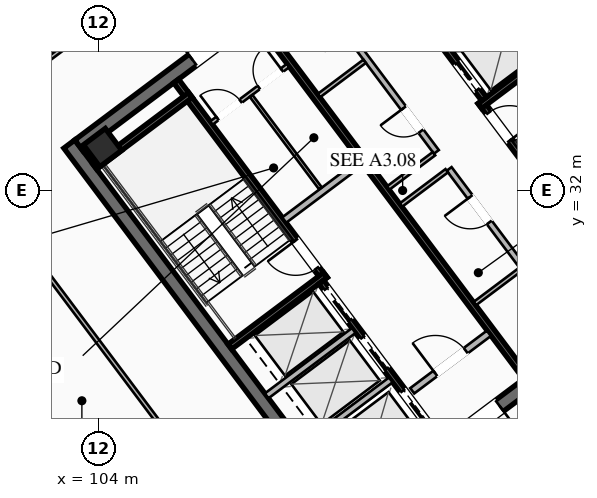
"""IFC4 building model, lengths in metres.
Left out: names, types, materials, properties, quantities, classifications, styles, units other than length and angle.
Written with IfcOpenShell. Run it as: python <this file> out.ifc"""

import sys

from ifc_helpers import new_model, si_unit, direction, frame, frame_2d, origin, origin_2d, place, context, subcontext, project, spatial, rectangle, hollow_rectangle, extrude, element, fill, save


model = new_model("IFC4")
c1 = context("Model", 3, precision=1e-05, world=origin(), true_north=direction((0.0, 1.0)))
c2 = subcontext(c1, "Body", "Model", "MODEL_VIEW")
j1 = project(units=[si_unit("LENGTHUNIT", "METRE"), si_unit("PLANEANGLEUNIT", "RADIAN")], contexts=[c1])
p1 = place(None, origin())
s1 = spatial("IfcSite", under=j1, at=p1, CompositionType="ELEMENT")
p2 = place(p1, origin())
s2 = spatial("IfcBuilding", under=s1, at=p2, CompositionType="ELEMENT")
p3 = place(p2, frame((0.0, 0.0, 239.7)))
s3 = spatial("IfcBuildingStorey", under=s2, at=p3, CompositionType="ELEMENT", Elevation=239.7)
for number, where, z_axis, x_axis in (
    (1, (112.396, 21.047, 0.0), (0.0, 0.0, 1.0), (-0.6, 0.8, 0.0)),
    (2, (115.604, 42.953, 0.0), (0.0, 0.0, 1.0), (0.6, -0.8, 0.0)),
):
    element("IfcWall", number, at=place(p3, frame(where, z_axis=z_axis, x_axis=x_axis)), inside=s3, PredefinedType="SHEAR", context=c2, shape_type="SweptSolid", body=[
        extrude(rectangle(XDim=15.6, YDim=0.45, at=frame_2d((7.8, 0.0))), origin(), (0.0, 0.0, 1.0), 3.55),
    ])
p4 = place(p3, frame((124.649, 30.518, 0.0), z_axis=(0.0, 0.0, 1.0), x_axis=(-0.8, -0.6, 0.0)))
e3 = element("IfcWall", 3, at=p4, inside=s3, PredefinedType="SHEAR", context=c2, shape_type="SweptSolid", body=[
    extrude(rectangle(XDim=15.26, YDim=0.45, at=frame_2d((7.63, 0.0))), origin(), (0.0, 0.0, 1.0), 3.55),
])
p5 = place(p4, frame((9.33, 0.0, 0.0)))
e4 = element("IfcOpeningElement", 4, at=p5, cuts=e3, PredefinedType="OPENING", context=c2, shape_type="SweptSolid", body=[
    extrude(rectangle(XDim=1.25, YDim=2.25, at=frame_2d((0.625, 1.125))), frame((0.0, 0.235, 0.0), z_axis=(0.0, -1.0, 0.0), x_axis=(1.0, 0.0, 0.0)), (0.0, 0.0, 1.0), 0.47),
])
p6 = place(p4, frame((4.28, 0.0, 0.0)))
e5 = element("IfcOpeningElement", 5, at=p6, cuts=e3, PredefinedType="OPENING", context=c2, shape_type="SweptSolid", body=[
    extrude(rectangle(XDim=1.25, YDim=2.25, at=frame_2d((0.625, 1.125))), frame((0.0, 0.235, 0.0), z_axis=(0.0, -1.0, 0.0), x_axis=(1.0, 0.0, 0.0)), (0.0, 0.0, 1.0), 0.47),
])
p7 = place(p3, frame((103.351, 33.482, 0.0), z_axis=(0.0, 0.0, 1.0), x_axis=(0.8, 0.6, 0.0)))
e6 = element("IfcWall", 6, at=p7, inside=s3, PredefinedType="SHEAR", context=c2, shape_type="SweptSolid", body=[
    extrude(rectangle(XDim=15.26, YDim=0.45, at=frame_2d((7.63, 0.0))), origin(), (0.0, 0.0, 1.0), 3.55),
])
p8 = place(p7, frame((4.68, 0.0, 0.0)))
e7 = element("IfcOpeningElement", 7, at=p8, cuts=e6, PredefinedType="OPENING", context=c2, shape_type="SweptSolid", body=[
    extrude(rectangle(XDim=1.25, YDim=2.25, at=frame_2d((0.625, 1.125))), frame((0.0, 0.235, 0.0), z_axis=(0.0, -1.0, 0.0), x_axis=(1.0, 0.0, 0.0)), (0.0, 0.0, 1.0), 0.47),
])
p9 = place(p7, frame((9.73, 0.0, 0.0)))
e8 = element("IfcOpeningElement", 8, at=p9, cuts=e6, PredefinedType="OPENING", context=c2, shape_type="SweptSolid", body=[
    extrude(rectangle(XDim=1.25, YDim=2.25, at=frame_2d((0.625, 1.125))), frame((0.0, 0.235, 0.0), z_axis=(0.0, -1.0, 0.0), x_axis=(1.0, 0.0, 0.0)), (0.0, 0.0, 1.0), 0.47),
])
p10 = place(p3, frame((104.13, 33.41, 0.0), z_axis=(0.0, 0.0, 1.0), x_axis=(0.799999996291, 0.600000004945, 0.0)))
e9 = element("IfcColumn", 9, at=p10, inside=s3, PredefinedType="COLUMN", context=c2, shape_type="SweptSolid", body=[
    extrude(hollow_rectangle(XDim=0.9, YDim=0.9, WallThickness=0.04, at=origin_2d()), origin(), (0.0, 0.0, 1.0), 3.37),
])
p11 = place(p3, frame((111.44, 29.08, 0.0), z_axis=(0.0, 0.0, 1.0), x_axis=(-0.59999041401, 0.800007189403, 0.0)))
e10 = element("IfcWall", 10, at=p11, inside=s3, PredefinedType="SHEAR", context=c2, shape_type="SweptSolid", body=[
    extrude(rectangle(XDim=8.15, YDim=0.2, at=frame_2d((4.075, 0.0))), origin(), (0.0, 0.0, 1.0), 3.37),
])
p12 = place(p11, frame((0.45, 0.0, 0.0)))
e11 = element("IfcOpeningElement", 11, at=p12, cuts=e10, PredefinedType="OPENING", context=c2, shape_type="SweptSolid", body=[
    extrude(rectangle(XDim=1.15, YDim=2.2, at=frame_2d((0.575, 1.1))), frame((0.0, 0.11, 0.0), z_axis=(0.0, -1.0, 0.0), x_axis=(1.0, 0.0, 0.0)), (0.0, 0.0, 1.0), 0.22),
])
for number, where, z_axis, x_axis in (
    (12, (108.316, 26.862, 0.0), (0.0, 0.0, 1.0), (0.8, 0.6, 0.0)),
    (13, (103.876, 32.782, 0.0), (0.0, 0.0, 1.0), (0.8, 0.6, 0.0)),
):
    element("IfcWall", number, at=place(p3, frame(where, z_axis=z_axis, x_axis=x_axis)), inside=s3, PredefinedType="SHEAR", context=c2, shape_type="SweptSolid", body=[
        extrude(rectangle(XDim=3.93, YDim=0.2, at=frame_2d((1.965, 0.0))), origin(), (0.0, 0.0, 1.0), 3.37),
    ])
p13 = place(p3, frame((116.56, 34.92, 0.0), z_axis=(0.0, 0.0, 1.0), x_axis=(0.59999041401, -0.800007189403, 0.0)))
e14 = element("IfcWall", 14, at=p13, inside=s3, PredefinedType="SHEAR", context=c2, shape_type="SweptSolid", body=[
    extrude(rectangle(XDim=8.15, YDim=0.2, at=frame_2d((4.075, 0.0))), origin(), (0.0, 0.0, 1.0), 3.37),
])
p14 = place(p13, frame((0.45, 0.0, 0.0)))
e15 = element("IfcOpeningElement", 15, at=p14, cuts=e14, PredefinedType="OPENING", context=c2, shape_type="SweptSolid", body=[
    extrude(rectangle(XDim=1.15, YDim=2.2, at=frame_2d((0.575, 1.1))), frame((0.0, 0.11, 0.0), z_axis=(0.0, -1.0, 0.0), x_axis=(1.0, 0.0, 0.0)), (0.0, 0.0, 1.0), 0.22),
])
p15 = place(p3, frame((116.54, 34.78, 0.0), z_axis=(0.0, 0.0, 1.0), x_axis=(0.800014909178, 0.599980120581, 0.0)))
e16 = element("IfcWall", 16, at=p15, inside=s3, PredefinedType="SHEAR", context=c2, shape_type="SweptSolid", body=[
    extrude(rectangle(XDim=3.93, YDim=0.2, at=frame_2d((1.965, 0.0))), origin(), (0.0, 0.0, 1.0), 3.37),
])
p16 = place(p3, frame((118.058, 25.856, 0.0), z_axis=(0.0, 0.0, 1.0), x_axis=(-0.600002657301, 0.799998007018, 0.0)))
e17 = element("IfcWall", 17, at=p16, inside=s3, PredefinedType="SHEAR", context=c2, shape_type="SweptSolid", body=[
    extrude(rectangle(XDim=14.7, YDim=0.2, at=frame_2d((7.35, 0.0))), origin(), (0.0, 0.0, 1.0), 3.37),
])
p17 = place(p3, frame((110.104, 31.028, 0.0), z_axis=(0.0, 0.0, 1.0), x_axis=(0.800018601094, 0.59997519774, 0.0)))
e18 = element("IfcWall", 18, at=p17, inside=s3, PredefinedType="SOLIDWALL", context=c2, shape_type="SweptSolid", body=[
    extrude(rectangle(XDim=3.15, YDim=0.22, at=frame_2d((1.575, 0.0))), origin(), (0.0, 0.0, 1.0), 2.723),
])
p18 = place(p3, frame((114.316, 25.412, 0.0), z_axis=(0.0, 0.0, 1.0), x_axis=(0.800018601094, 0.59997519774, 0.0)))
e19 = element("IfcWall", 19, at=p18, inside=s3, PredefinedType="SOLIDWALL", context=c2, shape_type="SweptSolid", body=[
    extrude(rectangle(XDim=3.15, YDim=0.22, at=frame_2d((1.575, 0.0))), origin(), (0.0, 0.0, 1.0), 2.723),
])
p19 = place(p18, frame((0.95, 0.0, 0.0)))
e20 = element("IfcOpeningElement", 20, at=p19, cuts=e19, PredefinedType="OPENING", context=c2, shape_type="SweptSolid", body=[
    extrude(rectangle(XDim=1.25, YDim=2.25, at=frame_2d((0.625, 1.125))), frame((0.0, 0.12, 0.0), z_axis=(0.0, -1.0, 0.0), x_axis=(1.0, 0.0, 0.0)), (0.0, 0.0, 1.0), 0.24),
])
p20 = place(p3, frame((115.25, 23.75, 0.0), z_axis=(0.0, 0.0, 1.0), x_axis=(-0.599994036198, 0.800004472816, 0.0)))
e21 = element("IfcWall", 21, at=p20, inside=s3, PredefinedType="SHEAR", context=c2, shape_type="SweptSolid", body=[
    extrude(rectangle(XDim=6.55, YDim=0.2, at=frame_2d((3.275, 0.0))), origin(), (0.0, 0.0, 1.0), 3.37),
])
p21 = place(p20, frame((4.975, 0.0, 0.0)))
e22 = element("IfcOpeningElement", 22, at=p21, cuts=e21, PredefinedType="OPENING", context=c2, shape_type="SweptSolid", body=[
    extrude(rectangle(XDim=1.3, YDim=2.25, at=frame_2d((0.65, 1.125))), frame((0.0, 0.11, 0.0), z_axis=(0.0, -1.0, 0.0), x_axis=(1.0, 0.0, 0.0)), (0.0, 0.0, 1.0), 0.22),
])
p22 = place(p20, frame((2.975, 0.0, 0.0)))
e23 = element("IfcOpeningElement", 23, at=p22, cuts=e21, PredefinedType="OPENING", context=c2, shape_type="SweptSolid", body=[
    extrude(rectangle(XDim=1.3, YDim=2.25, at=frame_2d((0.65, 1.125))), frame((0.0, 0.11, 0.0), z_axis=(0.0, -1.0, 0.0), x_axis=(1.0, 0.0, 0.0)), (0.0, 0.0, 1.0), 0.22),
])
p23 = place(p20, frame((0.775, 0.0, 0.0)))
e24 = element("IfcOpeningElement", 24, at=p23, cuts=e21, PredefinedType="OPENING", context=c2, shape_type="SweptSolid", body=[
    extrude(rectangle(XDim=1.3, YDim=2.25, at=frame_2d((0.65, 1.125))), frame((0.0, 0.11, 0.0), z_axis=(0.0, -1.0, 0.0), x_axis=(1.0, 0.0, 0.0)), (0.0, 0.0, 1.0), 0.22),
])
for number, where, z_axis, x_axis in (
    (25, (110.746, 23.622, 0.0), (0.0, 0.0, 1.0), (0.8, 0.6, 0.0)),
    (26, (109.528, 25.246, 0.0), (0.0, 0.0, 1.0), (0.8, 0.6, 0.0)),
):
    element("IfcWall", number, at=place(p3, frame(where, z_axis=z_axis, x_axis=x_axis)), inside=s3, PredefinedType="SOLIDWALL", context=c2, shape_type="SweptSolid", body=[
        extrude(rectangle(XDim=3.58, YDim=0.2, at=frame_2d((1.79, 0.0))), origin(), (0.0, 0.0, 1.0), 3.37),
    ])
p24 = place(p3, frame((112.75, 40.25, 0.0), z_axis=(0.0, 0.0, 1.0), x_axis=(0.599994036198, -0.800004472816, 0.0)))
e27 = element("IfcWall", 27, at=p24, inside=s3, PredefinedType="SHEAR", context=c2, shape_type="SweptSolid", body=[
    extrude(rectangle(XDim=6.55, YDim=0.2, at=frame_2d((3.275, 0.0))), origin(), (0.0, 0.0, 1.0), 3.37),
])
p25 = place(p24, frame((5.075, 0.0, 0.0)))
e28 = element("IfcOpeningElement", 28, at=p25, cuts=e27, PredefinedType="OPENING", context=c2, shape_type="SweptSolid", body=[
    extrude(rectangle(XDim=1.1, YDim=2.2, at=frame_2d((0.55, 1.1))), frame((0.0, 0.11, 0.0), z_axis=(0.0, -1.0, 0.0), x_axis=(1.0, 0.0, 0.0)), (0.0, 0.0, 1.0), 0.22),
])
p26 = place(p24, frame((3.025, 0.0, 0.0)))
e29 = element("IfcOpeningElement", 29, at=p26, cuts=e27, PredefinedType="OPENING", context=c2, shape_type="SweptSolid", body=[
    extrude(rectangle(XDim=1.1, YDim=2.2, at=frame_2d((0.55, 1.1))), frame((0.0, 0.11, 0.0), z_axis=(0.0, -1.0, 0.0), x_axis=(1.0, 0.0, 0.0)), (0.0, 0.0, 1.0), 0.22),
])
p27 = place(p24, frame((1.025, 0.0, 0.0)))
e30 = element("IfcOpeningElement", 30, at=p27, cuts=e27, PredefinedType="OPENING", context=c2, shape_type="SweptSolid", body=[
    extrude(rectangle(XDim=1.1, YDim=2.2, at=frame_2d((0.55, 1.1))), frame((0.0, 0.11, 0.0), z_axis=(0.0, -1.0, 0.0), x_axis=(1.0, 0.0, 0.0)), (0.0, 0.0, 1.0), 0.22),
])
p28 = place(p3, frame((107.71, 34.22, 0.0), z_axis=(0.0, 0.0, 1.0), x_axis=(0.799981399002, 0.60002480053, 0.0)))
e31 = element("IfcWall", 31, at=p28, inside=s3, PredefinedType="PARTITIONING", context=c2, shape_type="SweptSolid", body=[
    extrude(rectangle(XDim=3.15, YDim=0.135, at=frame_2d((1.575, 0.0))), origin(), (0.0, 0.0, 1.0), 2.723),
])
p29 = place(p28, frame((0.25, 0.0, 0.0)))
e32 = element("IfcOpeningElement", 32, at=p29, cuts=e31, PredefinedType="OPENING", context=c2, shape_type="SweptSolid", body=[
    extrude(rectangle(XDim=0.95, YDim=2.05, at=frame_2d((0.475, 1.025))), frame((0.0, 0.077, 0.0), z_axis=(0.0, -1.0, 0.0), x_axis=(1.0, 0.0, 0.0)), (0.0, 0.0, 1.0), 0.155),
])
p30 = place(p28, frame((1.95, 0.0, 0.0)))
e33 = element("IfcOpeningElement", 33, at=p30, cuts=e31, PredefinedType="OPENING", context=c2, shape_type="SweptSolid", body=[
    extrude(rectangle(XDim=0.95, YDim=2.05, at=frame_2d((0.475, 1.025))), frame((0.0, 0.077, 0.0), z_axis=(0.0, -1.0, 0.0), x_axis=(1.0, 0.0, 0.0)), (0.0, 0.0, 1.0), 0.155),
])
p31 = place(p3, frame((111.296, 32.072, 0.0), z_axis=(0.0, 0.0, 1.0), x_axis=(-0.59995887973, 0.800030838552, 0.0)))
e34 = element("IfcWall", 34, at=p31, inside=s3, PredefinedType="PARTITIONING", context=c2, shape_type="SweptSolid", body=[
    extrude(rectangle(XDim=3.8, YDim=0.11, at=frame_2d((1.9, 0.0))), origin(), (0.0, 0.0, 1.0), 2.723),
])
p32 = place(p3, frame((119.73, 27.11, 0.0), z_axis=(0.0, 0.0, 1.0), x_axis=(-0.600005580459, 0.799995814625, 0.0)))
e35 = element("IfcWall", 35, at=p32, inside=s3, PredefinedType="SOLIDWALL", context=c2, shape_type="SweptSolid", body=[
    extrude(rectangle(XDim=7.0, YDim=0.2, at=frame_2d((3.5, 0.0))), origin(), (0.0, 0.0, 1.0), 2.723),
])
p33 = place(p32, frame((0.85, 0.0, 0.0)))
e36 = element("IfcOpeningElement", 36, at=p33, cuts=e35, PredefinedType="OPENING", context=c2, shape_type="SweptSolid", body=[
    extrude(rectangle(XDim=0.95, YDim=2.05, at=frame_2d((0.475, 1.025))), frame((0.0, 0.11, 0.0), z_axis=(0.0, -1.0, 0.0), x_axis=(1.0, 0.0, 0.0)), (0.0, 0.0, 1.0), 0.22),
])
p34 = place(p32, frame((4.8, 0.0, 0.0)))
e37 = element("IfcOpeningElement", 37, at=p34, cuts=e35, PredefinedType="OPENING", context=c2, shape_type="SweptSolid", body=[
    extrude(rectangle(XDim=1.05, YDim=2.2, at=frame_2d((0.525, 1.1))), frame((0.0, 0.11, 0.0), z_axis=(0.0, -1.0, 0.0), x_axis=(1.0, 0.0, 0.0)), (0.0, 0.0, 1.0), 0.22),
])
for number, where, z_axis, x_axis in (
    (38, (113.946, 31.522, 0.0), (0.0, 0.0, 1.0), (0.8, 0.6, 0.0)),
    (39, (116.376, 28.282, 0.0), (0.0, 0.0, 1.0), (0.8, 0.6, 0.0)),
):
    element("IfcWall", number, at=place(p3, frame(where, z_axis=z_axis, x_axis=x_axis)), inside=s3, PredefinedType="PARTITIONING", context=c2, shape_type="SweptSolid", body=[
        extrude(rectangle(XDim=1.88, YDim=0.135, at=frame_2d((0.94, 0.0))), origin(), (0.0, 0.0, 1.0), 2.723),
    ])
p35 = place(p3, frame((115.11, 33.27, 0.0), z_axis=(0.0, 0.0, 1.0), x_axis=(-0.600011160345, 0.79999162962, 0.0)))
e40 = element("IfcWall", 40, at=p35, inside=s3, PredefinedType="SOLIDWALL", context=c2, shape_type="SweptSolid", body=[
    extrude(rectangle(XDim=7.0, YDim=0.2, at=frame_2d((3.5, 0.0))), origin(), (0.0, 0.0, 1.0), 2.723),
])
p36 = place(p35, frame((0.85, 0.0, 0.0)))
e41 = element("IfcOpeningElement", 41, at=p36, cuts=e40, PredefinedType="OPENING", context=c2, shape_type="SweptSolid", body=[
    extrude(rectangle(XDim=0.95, YDim=2.05, at=frame_2d((0.475, 1.025))), frame((0.0, 0.11, 0.0), z_axis=(0.0, -1.0, 0.0), x_axis=(1.0, 0.0, 0.0)), (0.0, 0.0, 1.0), 0.22),
])
p37 = place(p35, frame((4.85, 0.0, 0.0)))
e42 = element("IfcOpeningElement", 42, at=p37, cuts=e40, PredefinedType="OPENING", context=c2, shape_type="SweptSolid", body=[
    extrude(rectangle(XDim=0.95, YDim=2.05, at=frame_2d((0.475, 1.025))), frame((0.0, 0.11, 0.0), z_axis=(0.0, -1.0, 0.0), x_axis=(1.0, 0.0, 0.0)), (0.0, 0.0, 1.0), 0.22),
])
p38 = place(p3, frame((113.526, 32.082, 0.0), z_axis=(0.0, 0.0, 1.0), x_axis=(0.800046745961, 0.599937666993, 0.0)))
e43 = element("IfcWall", 43, at=p38, inside=s3, PredefinedType="PARTITIONING", context=c2, shape_type="SweptSolid", body=[
    extrude(rectangle(XDim=1.88, YDim=0.135, at=frame_2d((0.94, 0.0))), origin(), (0.0, 0.0, 1.0), 2.723),
])
p39 = place(p3, frame((111.246, 35.122, 0.0), z_axis=(0.0, 0.0, 1.0), x_axis=(0.8, 0.6, 0.0)))
e44 = element("IfcWall", 44, at=p39, inside=s3, PredefinedType="PARTITIONING", context=c2, shape_type="SweptSolid", body=[
    extrude(rectangle(XDim=1.88, YDim=0.135, at=frame_2d((0.94, 0.0))), origin(), (0.0, 0.0, 1.0), 2.723),
])
p40 = place(p3, frame((98.93, 33.76, 0.0), z_axis=(0.0, 0.0, 1.0), x_axis=(0.8, 0.6, 0.0)))
e45 = element("IfcWall", 45, at=p40, inside=s3, PredefinedType="PARTITIONING", context=c2, shape_type="SweptSolid", body=[
    extrude(rectangle(XDim=23.85, YDim=0.135, at=frame_2d((11.925, 0.0))), origin(), (0.0, 0.0, 1.0), 2.723),
])
p41 = place(p40, frame((0.3, 0.0, 0.0)))
e46 = element("IfcOpeningElement", 46, at=p41, cuts=e45, PredefinedType="OPENING", context=c2, shape_type="SweptSolid", body=[
    extrude(rectangle(XDim=0.95, YDim=2.05, at=frame_2d((0.475, 1.025))), frame((0.0, 0.077, 0.0), z_axis=(0.0, -1.0, 0.0), x_axis=(1.0, 0.0, 0.0)), (0.0, 0.0, 1.0), 0.155),
])
p42 = place(p40, frame((10.779, 0.0, 0.0)))
e47 = element("IfcOpeningElement", 47, at=p42, cuts=e45, PredefinedType="OPENING", context=c2, shape_type="SweptSolid", body=[
    extrude(rectangle(XDim=0.95, YDim=2.05, at=frame_2d((0.475, 1.025))), frame((0.0, 0.077, 0.0), z_axis=(0.0, -1.0, 0.0), x_axis=(1.0, 0.0, 0.0)), (0.0, 0.0, 1.0), 0.155),
])
p43 = place(p40, frame((14.585, 0.0, 0.0)))
e48 = element("IfcOpeningElement", 48, at=p43, cuts=e45, PredefinedType="OPENING", context=c2, shape_type="SweptSolid", body=[
    extrude(rectangle(XDim=0.95, YDim=2.05, at=frame_2d((0.475, 1.025))), frame((0.0, 0.077, 0.0), z_axis=(0.0, -1.0, 0.0), x_axis=(1.0, 0.0, 0.0)), (0.0, 0.0, 1.0), 0.155),
])
p44 = place(p40, frame((22.6, 0.0, 0.0)))
e49 = element("IfcOpeningElement", 49, at=p44, cuts=e45, PredefinedType="OPENING", context=c2, shape_type="SweptSolid", body=[
    extrude(rectangle(XDim=0.95, YDim=2.05, at=frame_2d((0.475, 1.025))), frame((0.0, 0.077, 0.0), z_axis=(0.0, -1.0, 0.0), x_axis=(1.0, 0.0, 0.0)), (0.0, 0.0, 1.0), 0.155),
])
p45 = place(p3, frame((124.12, 25.84, 0.0), z_axis=(0.0, 0.0, 1.0), x_axis=(-0.800001902384, -0.599997463479, 0.0)))
e50 = element("IfcWall", 50, at=p45, inside=s3, PredefinedType="PARTITIONING", context=c2, shape_type="SweptSolid", body=[
    extrude(rectangle(XDim=15.4, YDim=0.135, at=frame_2d((7.7, 0.0))), origin(), (0.0, 0.0, 1.0), 2.723),
])
p46 = place(p45, frame((14.07, 0.0, 0.0)))
e51 = element("IfcOpeningElement", 51, at=p46, cuts=e50, PredefinedType="OPENING", context=c2, shape_type="SweptSolid", body=[
    extrude(rectangle(XDim=0.95, YDim=2.05, at=frame_2d((0.475, 1.025))), frame((0.0, 0.077, 0.0), z_axis=(0.0, -1.0, 0.0), x_axis=(1.0, 0.0, 0.0)), (0.0, 0.0, 1.0), 0.155),
])
p47 = place(p45, frame((3.64, 0.0, 0.0)))
e52 = element("IfcOpeningElement", 52, at=p47, cuts=e50, PredefinedType="OPENING", context=c2, shape_type="SweptSolid", body=[
    extrude(rectangle(XDim=0.95, YDim=2.05, at=frame_2d((0.475, 1.025))), frame((0.0, 0.077, 0.0), z_axis=(0.0, -1.0, 0.0), x_axis=(1.0, 0.0, 0.0)), (0.0, 0.0, 1.0), 0.155),
])
p48 = place(p45, frame((0.38, 0.0, 0.0)))
e53 = element("IfcOpeningElement", 53, at=p48, cuts=e50, PredefinedType="OPENING", context=c2, shape_type="SweptSolid", body=[
    extrude(rectangle(XDim=0.95, YDim=2.05, at=frame_2d((0.475, 1.025))), frame((0.0, 0.077, 0.0), z_axis=(0.0, -1.0, 0.0), x_axis=(1.0, 0.0, 0.0)), (0.0, 0.0, 1.0), 0.155),
])
p49 = place(p3, frame((111.752, 16.664, 0.0), z_axis=(0.0, 0.0, 1.0), x_axis=(-0.599998165212, 0.800001376088, 0.0)))
e54 = element("IfcWall", 54, at=p49, inside=s3, PredefinedType="PARTITIONING", context=c2, shape_type="SweptSolid", body=[
    extrude(rectangle(XDim=21.29, YDim=0.135, at=frame_2d((10.645, 0.0))), origin(), (0.0, 0.0, 1.0), 2.723),
])
p50 = place(p49, frame((0.3, 0.0, 0.0)))
e55 = element("IfcOpeningElement", 55, at=p50, cuts=e54, PredefinedType="OPENING", context=c2, shape_type="SweptSolid", body=[
    extrude(rectangle(XDim=0.95, YDim=2.05, at=frame_2d((0.475, 1.025))), frame((0.0, 0.077, 0.0), z_axis=(0.0, -1.0, 0.0), x_axis=(1.0, 0.0, 0.0)), (0.0, 0.0, 1.0), 0.155),
])
p51 = place(p8, origin())
e56 = element("IfcDoor", 56, at=p51, inside=s3, OperationType="SINGLE_SWING_LEFT", PredefinedType="DOOR", context=c2, shape_type="SweptSolid", body=[
    extrude(rectangle(XDim=1.25, YDim=2.25, at=frame_2d((0.625, 1.125))), frame((0.0, 0.025, 0.0), z_axis=(0.0, -1.0, 0.0), x_axis=(1.0, 0.0, 0.0)), (0.0, 0.0, 1.0), 0.05),
])
fill(e7, e56)
p52 = place(p5, origin())
e57 = element("IfcDoor", 57, at=p52, inside=s3, OperationType="SINGLE_SWING_LEFT", PredefinedType="DOOR", context=c2, shape_type="SweptSolid", body=[
    extrude(rectangle(XDim=1.25, YDim=2.25, at=frame_2d((0.625, 1.125))), frame((0.0, 0.025, 0.0), z_axis=(0.0, -1.0, 0.0), x_axis=(1.0, 0.0, 0.0)), (0.0, 0.0, 1.0), 0.05),
])
fill(e4, e57)
p53 = place(p12, origin())
e58 = element("IfcDoor", 58, at=p53, inside=s3, OperationType="SINGLE_SWING_RIGHT", PredefinedType="DOOR", context=c2, shape_type="SweptSolid", body=[
    extrude(rectangle(XDim=1.15, YDim=2.2, at=frame_2d((0.575, 1.1))), frame((0.0, 0.025, 0.0), z_axis=(0.0, -1.0, 0.0), x_axis=(1.0, 0.0, 0.0)), (0.0, 0.0, 1.0), 0.05),
])
fill(e11, e58)
p54 = place(p14, origin())
e59 = element("IfcDoor", 59, at=p54, inside=s3, OperationType="SINGLE_SWING_RIGHT", PredefinedType="DOOR", context=c2, shape_type="SweptSolid", body=[
    extrude(rectangle(XDim=1.15, YDim=2.2, at=frame_2d((0.575, 1.1))), frame((0.0, 0.025, 0.0), z_axis=(0.0, -1.0, 0.0), x_axis=(1.0, 0.0, 0.0)), (0.0, 0.0, 1.0), 0.05),
])
fill(e15, e59)
p55 = place(p19, origin())
e60 = element("IfcDoor", 60, at=p55, inside=s3, OperationType="SINGLE_SWING_LEFT", PredefinedType="DOOR", context=c2, shape_type="SweptSolid", body=[
    extrude(rectangle(XDim=1.25, YDim=2.25, at=frame_2d((0.625, 1.125))), frame((0.0, 0.025, 0.0), z_axis=(0.0, -1.0, 0.0), x_axis=(1.0, 0.0, 0.0)), (0.0, 0.0, 1.0), 0.05),
])
fill(e20, e60)
p56 = place(p29, origin())
e61 = element("IfcDoor", 61, at=p56, inside=s3, OperationType="SINGLE_SWING_LEFT", PredefinedType="DOOR", context=c2, shape_type="SweptSolid", body=[
    extrude(rectangle(XDim=0.95, YDim=2.05, at=frame_2d((0.475, 1.025))), frame((0.0, 0.025, 0.0), z_axis=(0.0, -1.0, 0.0), x_axis=(1.0, 0.0, 0.0)), (0.0, 0.0, 1.0), 0.05),
])
fill(e32, e61)
p57 = place(p30, origin())
e62 = element("IfcDoor", 62, at=p57, inside=s3, OperationType="SINGLE_SWING_RIGHT", PredefinedType="DOOR", context=c2, shape_type="SweptSolid", body=[
    extrude(rectangle(XDim=0.95, YDim=2.05, at=frame_2d((0.475, 1.025))), frame((0.0, 0.025, 0.0), z_axis=(0.0, -1.0, 0.0), x_axis=(1.0, 0.0, 0.0)), (0.0, 0.0, 1.0), 0.05),
])
fill(e33, e62)
p58 = place(p34, origin())
e63 = element("IfcDoor", 63, at=p58, inside=s3, OperationType="SINGLE_SWING_RIGHT", PredefinedType="DOOR", context=c2, shape_type="SweptSolid", body=[
    extrude(rectangle(XDim=1.05, YDim=2.2, at=frame_2d((0.525, 1.1))), frame((0.0, 0.025, 0.0), z_axis=(0.0, -1.0, 0.0), x_axis=(1.0, 0.0, 0.0)), (0.0, 0.0, 1.0), 0.05),
])
fill(e37, e63)
p59 = place(p36, origin())
e64 = element("IfcDoor", 64, at=p59, inside=s3, OperationType="SINGLE_SWING_RIGHT", PredefinedType="DOOR", context=c2, shape_type="SweptSolid", body=[
    extrude(rectangle(XDim=0.95, YDim=2.05, at=frame_2d((0.475, 1.025))), frame((0.0, 0.025, 0.0), z_axis=(0.0, -1.0, 0.0), x_axis=(1.0, 0.0, 0.0)), (0.0, 0.0, 1.0), 0.05),
])
fill(e41, e64)
p60 = place(p21, origin())
e65 = element("IfcDoor", 65, at=p60, inside=s3, OperationType="SLIDING_TO_LEFT", PredefinedType="DOOR", context=c2, shape_type="SweptSolid", body=[
    extrude(rectangle(XDim=1.3, YDim=2.25, at=frame_2d((0.65, 1.125))), frame((0.0, 0.025, 0.0), z_axis=(0.0, -1.0, 0.0), x_axis=(1.0, 0.0, 0.0)), (0.0, 0.0, 1.0), 0.05),
])
fill(e22, e65)
p61 = place(p22, origin())
e66 = element("IfcDoor", 66, at=p61, inside=s3, OperationType="SLIDING_TO_LEFT", PredefinedType="DOOR", context=c2, shape_type="SweptSolid", body=[
    extrude(rectangle(XDim=1.3, YDim=2.25, at=frame_2d((0.65, 1.125))), frame((0.0, 0.025, 0.0), z_axis=(0.0, -1.0, 0.0), x_axis=(1.0, 0.0, 0.0)), (0.0, 0.0, 1.0), 0.05),
])
fill(e23, e66)
p62 = place(p23, origin())
e67 = element("IfcDoor", 67, at=p62, inside=s3, OperationType="SLIDING_TO_LEFT", PredefinedType="DOOR", context=c2, shape_type="SweptSolid", body=[
    extrude(rectangle(XDim=1.3, YDim=2.25, at=frame_2d((0.65, 1.125))), frame((0.0, 0.025, 0.0), z_axis=(0.0, -1.0, 0.0), x_axis=(1.0, 0.0, 0.0)), (0.0, 0.0, 1.0), 0.05),
])
fill(e24, e67)
p63 = place(p25, origin())
e68 = element("IfcDoor", 68, at=p63, inside=s3, OperationType="SLIDING_TO_LEFT", PredefinedType="DOOR", context=c2, shape_type="SweptSolid", body=[
    extrude(rectangle(XDim=1.1, YDim=2.2, at=frame_2d((0.55, 1.1))), frame((0.0, 0.025, 0.0), z_axis=(0.0, -1.0, 0.0), x_axis=(1.0, 0.0, 0.0)), (0.0, 0.0, 1.0), 0.05),
])
fill(e28, e68)
save(model, sys.argv[1])
